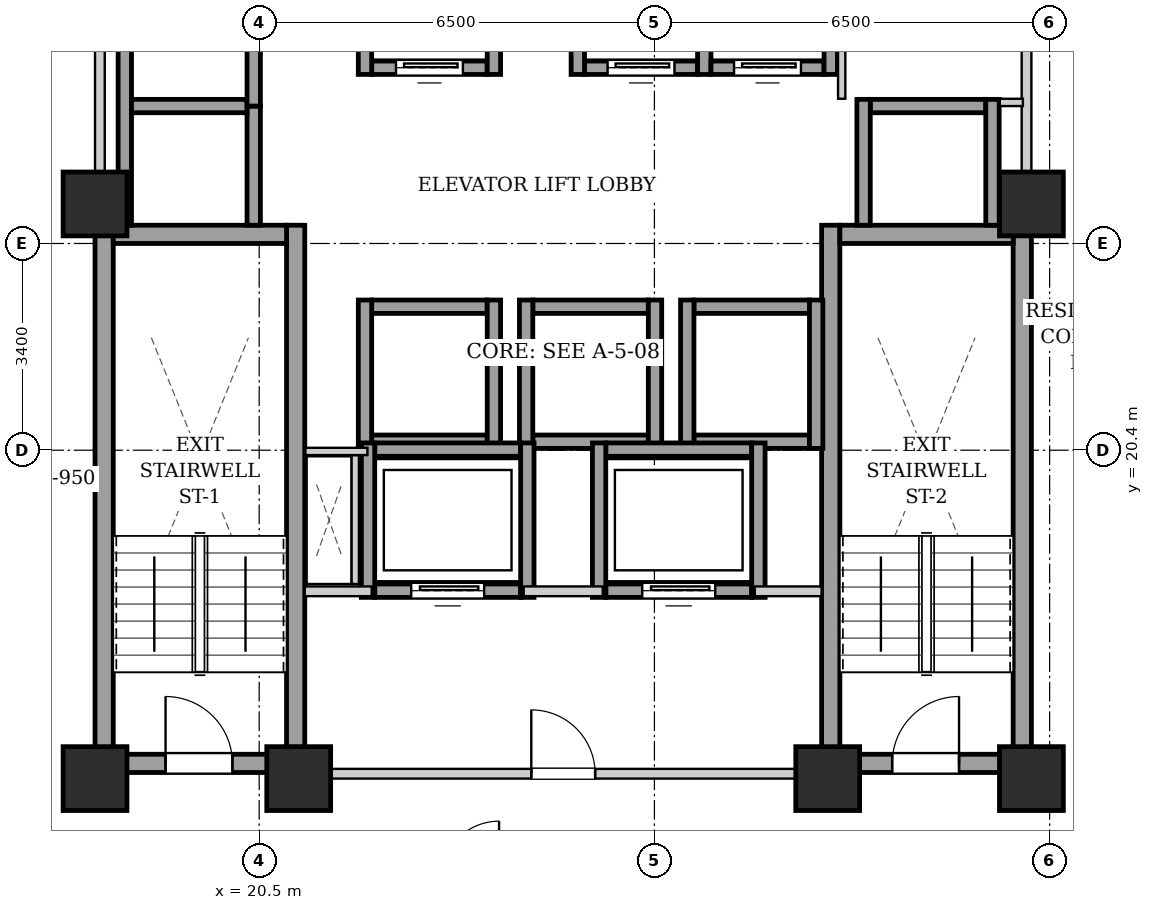
"""IFC4 building model, lengths in metres.
Left out: names, types, materials, properties, quantities, classifications, styles, units other than length and angle.
Written with IfcOpenShell. Run it as: python <this file> out.ifc"""

import sys

from ifc_helpers import new_model, si_unit, direction, frame, frame_2d, origin, origin_2d, place, context, subcontext, project, spatial, rectangle, extrude, element, fill, save


model = new_model("IFC4")
c1 = context("Model", 3, precision=1e-05, world=origin(), true_north=direction((0.0, 1.0)))
c2 = subcontext(c1, "Body", "Model", "MODEL_VIEW")
j1 = project(units=[si_unit("LENGTHUNIT", "METRE"), si_unit("PLANEANGLEUNIT", "RADIAN")], contexts=[c1])
p1 = place(None, origin())
s1 = spatial("IfcSite", under=j1, at=p1, CompositionType="ELEMENT")
p2 = place(p1, origin())
s2 = spatial("IfcBuilding", under=s1, at=p2, CompositionType="ELEMENT")
p3 = place(p2, frame((0.0, 0.0, 81.5)))
s3 = spatial("IfcBuildingStorey", under=s2, at=p3, CompositionType="ELEMENT", Elevation=81.5)
for number, where, z_axis, x_axis in (
    (1, (17.8, 15.0, 0.0), (0.0, 0.0, 1.0), (1.0, 0.0, 0.0)),
    (2, (21.15, 15.0, 0.0), (0.0, 0.0, 1.0), (1.0, 0.0, 0.0)),
    (3, (29.85, 15.0, 0.0), (0.0, 0.0, 1.0), (1.0, 0.0, 0.0)),
    (4, (33.2, 15.0, 0.0), (0.0, 0.0, 1.0), (1.0, 0.0, 0.0)),
    (5, (17.8, 24.45, 0.0), (0.0, 0.0, 1.0), (1.0, 0.0, 0.0)),
    (6, (33.2, 24.45, 0.0), (0.0, 0.0, 1.0), (1.0, 0.0, 0.0)),
):
    element("IfcColumn", number, at=place(p3, frame(where, z_axis=z_axis, x_axis=x_axis)), inside=s3, PredefinedType="COLUMN", context=c2, shape_type="SweptSolid", body=[
        extrude(rectangle(XDim=1.05, YDim=1.05, at=origin_2d()), origin(), (0.0, 0.0, 1.0), 3.2),
    ])
for number, where, z_axis, x_axis in (
    (7, (17.95, 15.1, 0.0), (0.0, 0.0, 1.0), (0.0, 1.0, 0.0)),
    (8, (21.1, 15.1, 0.0), (0.0, 0.0, 1.0), (0.0, 1.0, 0.0)),
):
    element("IfcWall", number, at=place(p3, frame(where, z_axis=z_axis, x_axis=x_axis)), inside=s3, PredefinedType="SHEAR", context=c2, shape_type="SweptSolid", body=[
        extrude(rectangle(XDim=9.0, YDim=0.3, at=frame_2d((4.5, 0.0))), origin(), (0.0, 0.0, 1.0), 2.94),
    ])
p4 = place(p3, frame((18.1, 23.95, 0.0), z_axis=(0.0, 0.0, 1.0), x_axis=(1.0, 0.0, 0.0)))
e9 = element("IfcWall", 9, at=p4, inside=s3, PredefinedType="SHEAR", context=c2, shape_type="SweptSolid", body=[
    extrude(rectangle(XDim=2.85, YDim=0.3, at=frame_2d((1.425, 0.0))), origin(), (0.0, 0.0, 1.0), 2.94),
])
p5 = place(p3, frame((18.1, 15.25, 0.0), z_axis=(0.0, 0.0, 1.0), x_axis=(1.0, 0.0, 0.0)))
e10 = element("IfcWall", 10, at=p5, inside=s3, PredefinedType="SHEAR", context=c2, shape_type="SweptSolid", body=[
    extrude(rectangle(XDim=2.85, YDim=0.3, at=frame_2d((1.425, 0.0))), origin(), (0.0, 0.0, 1.0), 2.94),
])
p6 = place(p5, frame((0.86, 0.0, 0.0)))
e11 = element("IfcOpeningElement", 11, at=p6, cuts=e10, PredefinedType="OPENING", context=c2, shape_type="SweptSolid", body=[
    extrude(rectangle(XDim=1.1, YDim=2.05, at=frame_2d((0.55, 1.025))), frame((0.0, 0.16, 0.0), z_axis=(0.0, -1.0, 0.0), x_axis=(1.0, 0.0, 0.0)), (0.0, 0.0, 1.0), 0.32),
])
for number, where, z_axis, x_axis in (
    (12, (29.9, 15.1, 0.0), (0.0, 0.0, 1.0), (0.0, 1.0, 0.0)),
    (13, (33.05, 15.1, 0.0), (0.0, 0.0, 1.0), (0.0, 1.0, 0.0)),
):
    element("IfcWall", number, at=place(p3, frame(where, z_axis=z_axis, x_axis=x_axis)), inside=s3, PredefinedType="SHEAR", context=c2, shape_type="SweptSolid", body=[
        extrude(rectangle(XDim=9.0, YDim=0.3, at=frame_2d((4.5, 0.0))), origin(), (0.0, 0.0, 1.0), 2.94),
    ])
p7 = place(p3, frame((30.05, 23.95, 0.0), z_axis=(0.0, 0.0, 1.0), x_axis=(1.0, 0.0, 0.0)))
e14 = element("IfcWall", 14, at=p7, inside=s3, PredefinedType="SHEAR", context=c2, shape_type="SweptSolid", body=[
    extrude(rectangle(XDim=2.85, YDim=0.3, at=frame_2d((1.425, 0.0))), origin(), (0.0, 0.0, 1.0), 2.94),
])
p8 = place(p3, frame((30.05, 15.25, 0.0), z_axis=(0.0, 0.0, 1.0), x_axis=(1.0, 0.0, 0.0)))
e15 = element("IfcWall", 15, at=p8, inside=s3, PredefinedType="SHEAR", context=c2, shape_type="SweptSolid", body=[
    extrude(rectangle(XDim=2.85, YDim=0.3, at=frame_2d((1.425, 0.0))), origin(), (0.0, 0.0, 1.0), 2.94),
])
p9 = place(p8, frame((0.86, 0.0, 0.0)))
e16 = element("IfcOpeningElement", 16, at=p9, cuts=e15, PredefinedType="OPENING", context=c2, shape_type="SweptSolid", body=[
    extrude(rectangle(XDim=1.1, YDim=2.05, at=frame_2d((0.55, 1.025))), frame((0.0, 0.16, 0.0), z_axis=(0.0, -1.0, 0.0), x_axis=(1.0, 0.0, 0.0)), (0.0, 0.0, 1.0), 0.32),
])
p10 = place(p3, frame((22.35, 26.69, 0.0), z_axis=(0.0, 0.0, 1.0), x_axis=(1.0, 0.0, 0.0)))
e17 = element("IfcWall", 17, at=p10, inside=s3, PredefinedType="SHEAR", context=c2, shape_type="SweptSolid", body=[
    extrude(rectangle(XDim=1.9, YDim=0.22, at=frame_2d((0.95, 0.0))), origin(), (0.0, 0.0, 1.0), 2.94),
])
p11 = place(p10, frame((0.4, 0.0, 0.0)))
e18 = element("IfcOpeningElement", 18, at=p11, cuts=e17, PredefinedType="OPENING", context=c2, shape_type="SweptSolid", body=[
    extrude(rectangle(XDim=1.1, YDim=2.15, at=frame_2d((0.55, 1.075))), frame((0.0, 0.12, 0.0), z_axis=(0.0, -1.0, 0.0), x_axis=(1.0, 0.0, 0.0)), (0.0, 0.0, 1.0), 0.24),
])
for number, where, z_axis, x_axis in (
    (19, (22.24, 26.58, 0.0), (0.0, 0.0, 1.0), (0.0, 1.0, 0.0)),
    (20, (24.36, 26.58, 0.0), (0.0, 0.0, 1.0), (0.0, 1.0, 0.0)),
):
    element("IfcWall", number, at=place(p3, frame(where, z_axis=z_axis, x_axis=x_axis)), inside=s3, PredefinedType="SHEAR", context=c2, shape_type="SweptSolid", body=[
        extrude(rectangle(XDim=2.44, YDim=0.22, at=frame_2d((1.22, 0.0))), origin(), (0.0, 0.0, 1.0), 2.94),
    ])
p12 = place(p3, frame((25.85, 26.69, 0.0), z_axis=(0.0, 0.0, 1.0), x_axis=(1.0, 0.0, 0.0)))
e21 = element("IfcWall", 21, at=p12, inside=s3, PredefinedType="SHEAR", context=c2, shape_type="SweptSolid", body=[
    extrude(rectangle(XDim=1.86, YDim=0.22, at=frame_2d((0.93, 0.0))), origin(), (0.0, 0.0, 1.0), 2.94),
])
p13 = place(p12, frame((0.38, 0.0, 0.0)))
e22 = element("IfcOpeningElement", 22, at=p13, cuts=e21, PredefinedType="OPENING", context=c2, shape_type="SweptSolid", body=[
    extrude(rectangle(XDim=1.1, YDim=2.15, at=frame_2d((0.55, 1.075))), frame((0.0, 0.12, 0.0), z_axis=(0.0, -1.0, 0.0), x_axis=(1.0, 0.0, 0.0)), (0.0, 0.0, 1.0), 0.24),
])
for number, where, z_axis, x_axis in (
    (23, (25.74, 26.58, 0.0), (0.0, 0.0, 1.0), (0.0, 1.0, 0.0)),
    (24, (27.82, 26.58, 0.0), (0.0, 0.0, 1.0), (0.0, 1.0, 0.0)),
):
    element("IfcWall", number, at=place(p3, frame(where, z_axis=z_axis, x_axis=x_axis)), inside=s3, PredefinedType="SHEAR", context=c2, shape_type="SweptSolid", body=[
        extrude(rectangle(XDim=2.44, YDim=0.22, at=frame_2d((1.22, 0.0))), origin(), (0.0, 0.0, 1.0), 2.94),
    ])
p14 = place(p3, frame((27.93, 26.69, 0.0), z_axis=(0.0, 0.0, 1.0), x_axis=(1.0, 0.0, 0.0)))
e25 = element("IfcWall", 25, at=p14, inside=s3, PredefinedType="SHEAR", context=c2, shape_type="SweptSolid", body=[
    extrude(rectangle(XDim=1.86, YDim=0.22, at=frame_2d((0.93, 0.0))), origin(), (0.0, 0.0, 1.0), 2.94),
])
p15 = place(p14, frame((0.38, 0.0, 0.0)))
e26 = element("IfcOpeningElement", 26, at=p15, cuts=e25, PredefinedType="OPENING", context=c2, shape_type="SweptSolid", body=[
    extrude(rectangle(XDim=1.1, YDim=2.15, at=frame_2d((0.55, 1.075))), frame((0.0, 0.12, 0.0), z_axis=(0.0, -1.0, 0.0), x_axis=(1.0, 0.0, 0.0)), (0.0, 0.0, 1.0), 0.24),
])
p16 = place(p3, frame((29.9, 26.58, 0.0), z_axis=(0.0, 0.0, 1.0), x_axis=(0.0, 1.0, 0.0)))
e27 = element("IfcWall", 27, at=p16, inside=s3, PredefinedType="SHEAR", context=c2, shape_type="SweptSolid", body=[
    extrude(rectangle(XDim=2.44, YDim=0.22, at=frame_2d((1.22, 0.0))), origin(), (0.0, 0.0, 1.0), 2.94),
])
for number, where, z_axis, x_axis in (
    (28, (22.35, 20.54, 0.0), (0.0, 0.0, 1.0), (1.0, 0.0, 0.0)),
    (29, (22.35, 22.76, 0.0), (0.0, 0.0, 1.0), (1.0, 0.0, 0.0)),
):
    element("IfcWall", number, at=place(p3, frame(where, z_axis=z_axis, x_axis=x_axis)), inside=s3, PredefinedType="SHEAR", context=c2, shape_type="SweptSolid", body=[
        extrude(rectangle(XDim=1.9, YDim=0.22, at=frame_2d((0.95, 0.0))), origin(), (0.0, 0.0, 1.0), 2.94),
    ])
for number, where, z_axis, x_axis in (
    (30, (22.24, 20.43, 0.0), (0.0, 0.0, 1.0), (0.0, 1.0, 0.0)),
    (31, (24.36, 20.43, 0.0), (0.0, 0.0, 1.0), (0.0, 1.0, 0.0)),
):
    element("IfcWall", number, at=place(p3, frame(where, z_axis=z_axis, x_axis=x_axis)), inside=s3, PredefinedType="SHEAR", context=c2, shape_type="SweptSolid", body=[
        extrude(rectangle(XDim=2.44, YDim=0.22, at=frame_2d((1.22, 0.0))), origin(), (0.0, 0.0, 1.0), 2.94),
    ])
for number, where, z_axis, x_axis in (
    (32, (25.0, 20.54, 0.0), (0.0, 0.0, 1.0), (1.0, 0.0, 0.0)),
    (33, (25.0, 22.76, 0.0), (0.0, 0.0, 1.0), (1.0, 0.0, 0.0)),
):
    element("IfcWall", number, at=place(p3, frame(where, z_axis=z_axis, x_axis=x_axis)), inside=s3, PredefinedType="SHEAR", context=c2, shape_type="SweptSolid", body=[
        extrude(rectangle(XDim=1.9, YDim=0.22, at=frame_2d((0.95, 0.0))), origin(), (0.0, 0.0, 1.0), 2.94),
    ])
for number, where, z_axis, x_axis in (
    (34, (24.89, 20.43, 0.0), (0.0, 0.0, 1.0), (0.0, 1.0, 0.0)),
    (35, (27.01, 20.43, 0.0), (0.0, 0.0, 1.0), (0.0, 1.0, 0.0)),
):
    element("IfcWall", number, at=place(p3, frame(where, z_axis=z_axis, x_axis=x_axis)), inside=s3, PredefinedType="SHEAR", context=c2, shape_type="SweptSolid", body=[
        extrude(rectangle(XDim=2.44, YDim=0.22, at=frame_2d((1.22, 0.0))), origin(), (0.0, 0.0, 1.0), 2.94),
    ])
for number, where, z_axis, x_axis in (
    (36, (27.65, 20.54, 0.0), (0.0, 0.0, 1.0), (1.0, 0.0, 0.0)),
    (37, (27.65, 22.76, 0.0), (0.0, 0.0, 1.0), (1.0, 0.0, 0.0)),
):
    element("IfcWall", number, at=place(p3, frame(where, z_axis=z_axis, x_axis=x_axis)), inside=s3, PredefinedType="SHEAR", context=c2, shape_type="SweptSolid", body=[
        extrude(rectangle(XDim=1.9, YDim=0.22, at=frame_2d((0.95, 0.0))), origin(), (0.0, 0.0, 1.0), 2.94),
    ])
for number, where, z_axis, x_axis in (
    (38, (27.54, 20.43, 0.0), (0.0, 0.0, 1.0), (0.0, 1.0, 0.0)),
    (39, (29.66, 20.43, 0.0), (0.0, 0.0, 1.0), (0.0, 1.0, 0.0)),
):
    element("IfcWall", number, at=place(p3, frame(where, z_axis=z_axis, x_axis=x_axis)), inside=s3, PredefinedType="SHEAR", context=c2, shape_type="SweptSolid", body=[
        extrude(rectangle(XDim=2.44, YDim=0.22, at=frame_2d((1.22, 0.0))), origin(), (0.0, 0.0, 1.0), 2.94),
    ])
p17 = place(p3, frame((18.29, 24.1, 0.0), z_axis=(0.0, 0.0, 1.0), x_axis=(0.0, 1.0, 0.0)))
e40 = element("IfcWall", 40, at=p17, inside=s3, PredefinedType="SHEAR", context=c2, shape_type="SweptSolid", body=[
    extrude(rectangle(XDim=4.14, YDim=0.22, at=frame_2d((2.07, 0.0))), origin(), (0.0, 0.0, 1.0), 2.94),
])
p18 = place(p3, frame((20.41, 24.1, 0.0), z_axis=(0.0, 0.0, 1.0), x_axis=(0.0, 1.0, 0.0)))
e41 = element("IfcWall", 41, at=p18, inside=s3, PredefinedType="SHEAR", context=c2, shape_type="SweptSolid", body=[
    extrude(rectangle(XDim=1.96, YDim=0.22, at=frame_2d((0.98, 0.0))), origin(), (0.0, 0.0, 1.0), 2.94),
])
p19 = place(p3, frame((18.4, 26.06, 0.0), z_axis=(0.0, 0.0, 1.0), x_axis=(1.0, 0.0, 0.0)))
e42 = element("IfcWall", 42, at=p19, inside=s3, PredefinedType="SHEAR", context=c2, shape_type="SweptSolid", body=[
    extrude(rectangle(XDim=1.9, YDim=0.22, at=frame_2d((0.95, 0.0))), origin(), (0.0, 0.0, 1.0), 2.94),
])
p20 = place(p3, frame((20.41, 26.06, 0.0), z_axis=(0.0, 0.0, 1.0), x_axis=(0.0, 1.0, 0.0)))
e43 = element("IfcWall", 43, at=p20, inside=s3, PredefinedType="SHEAR", context=c2, shape_type="SweptSolid", body=[
    extrude(rectangle(XDim=2.18, YDim=0.22, at=frame_2d((1.09, 0.0))), origin(), (0.0, 0.0, 1.0), 2.94),
])
p21 = place(p3, frame((30.55, 26.06, 0.0), z_axis=(0.0, 0.0, 1.0), x_axis=(1.0, 0.0, 0.0)))
e44 = element("IfcWall", 44, at=p21, inside=s3, PredefinedType="SHEAR", context=c2, shape_type="SweptSolid", body=[
    extrude(rectangle(XDim=1.9, YDim=0.22, at=frame_2d((0.95, 0.0))), origin(), (0.0, 0.0, 1.0), 2.94),
])
for number, where, z_axis, x_axis in (
    (45, (30.44, 24.1, 0.0), (0.0, 0.0, 1.0), (0.0, 1.0, 0.0)),
    (46, (32.56, 24.1, 0.0), (0.0, 0.0, 1.0), (0.0, 1.0, 0.0)),
):
    element("IfcWall", number, at=place(p3, frame(where, z_axis=z_axis, x_axis=x_axis)), inside=s3, PredefinedType="SHEAR", context=c2, shape_type="SweptSolid", body=[
        extrude(rectangle(XDim=2.07, YDim=0.22, at=frame_2d((1.035, 0.0))), origin(), (0.0, 0.0, 1.0), 2.94),
    ])
p22 = place(p3, frame((22.4, 18.09, 0.0), z_axis=(0.0, 0.0, 1.0), x_axis=(1.0, 0.0, 0.0)))
e47 = element("IfcWall", 47, at=p22, inside=s3, PredefinedType="SHEAR", context=c2, shape_type="SweptSolid", body=[
    extrude(rectangle(XDim=2.4, YDim=0.22, at=frame_2d((1.2, 0.0))), origin(), (0.0, 0.0, 1.0), 2.94),
])
p23 = place(p22, frame((0.6, 0.0, 0.0)))
e48 = element("IfcOpeningElement", 48, at=p23, cuts=e47, PredefinedType="OPENING", context=c2, shape_type="SweptSolid", body=[
    extrude(rectangle(XDim=1.2, YDim=2.15, at=frame_2d((0.6, 1.075))), frame((0.0, 0.12, 0.0), z_axis=(0.0, -1.0, 0.0), x_axis=(1.0, 0.0, 0.0)), (0.0, 0.0, 1.0), 0.24),
])
p24 = place(p3, frame((22.4, 20.41, 0.0), z_axis=(0.0, 0.0, 1.0), x_axis=(1.0, 0.0, 0.0)))
e49 = element("IfcWall", 49, at=p24, inside=s3, PredefinedType="SHEAR", context=c2, shape_type="SweptSolid", body=[
    extrude(rectangle(XDim=2.4, YDim=0.22, at=frame_2d((1.2, 0.0))), origin(), (0.0, 0.0, 1.0), 2.94),
])
for number, where, z_axis, x_axis in (
    (50, (22.29, 17.98, 0.0), (0.0, 0.0, 1.0), (0.0, 1.0, 0.0)),
    (51, (24.91, 17.98, 0.0), (0.0, 0.0, 1.0), (0.0, 1.0, 0.0)),
):
    element("IfcWall", number, at=place(p3, frame(where, z_axis=z_axis, x_axis=x_axis)), inside=s3, PredefinedType="SHEAR", context=c2, shape_type="SweptSolid", body=[
        extrude(rectangle(XDim=2.54, YDim=0.22, at=frame_2d((1.27, 0.0))), origin(), (0.0, 0.0, 1.0), 2.94),
    ])
p25 = place(p3, frame((26.2, 18.09, 0.0), z_axis=(0.0, 0.0, 1.0), x_axis=(1.0, 0.0, 0.0)))
e52 = element("IfcWall", 52, at=p25, inside=s3, PredefinedType="SHEAR", context=c2, shape_type="SweptSolid", body=[
    extrude(rectangle(XDim=2.4, YDim=0.22, at=frame_2d((1.2, 0.0))), origin(), (0.0, 0.0, 1.0), 2.94),
])
p26 = place(p25, frame((0.6, 0.0, 0.0)))
e53 = element("IfcOpeningElement", 53, at=p26, cuts=e52, PredefinedType="OPENING", context=c2, shape_type="SweptSolid", body=[
    extrude(rectangle(XDim=1.2, YDim=2.15, at=frame_2d((0.6, 1.075))), frame((0.0, 0.12, 0.0), z_axis=(0.0, -1.0, 0.0), x_axis=(1.0, 0.0, 0.0)), (0.0, 0.0, 1.0), 0.24),
])
p27 = place(p3, frame((26.2, 20.41, 0.0), z_axis=(0.0, 0.0, 1.0), x_axis=(1.0, 0.0, 0.0)))
e54 = element("IfcWall", 54, at=p27, inside=s3, PredefinedType="SHEAR", context=c2, shape_type="SweptSolid", body=[
    extrude(rectangle(XDim=2.4, YDim=0.22, at=frame_2d((1.2, 0.0))), origin(), (0.0, 0.0, 1.0), 2.94),
])
for number, where, z_axis, x_axis in (
    (55, (26.09, 17.98, 0.0), (0.0, 0.0, 1.0), (0.0, 1.0, 0.0)),
    (56, (28.71, 17.98, 0.0), (0.0, 0.0, 1.0), (0.0, 1.0, 0.0)),
):
    element("IfcWall", number, at=place(p3, frame(where, z_axis=z_axis, x_axis=x_axis)), inside=s3, PredefinedType="SHEAR", context=c2, shape_type="SweptSolid", body=[
        extrude(rectangle(XDim=2.54, YDim=0.22, at=frame_2d((1.27, 0.0))), origin(), (0.0, 0.0, 1.0), 2.94),
    ])
p28 = place(p3, frame((21.25, 15.08, 0.0), z_axis=(0.0, 0.0, 1.0), x_axis=(1.0, 0.0, 0.0)))
e57 = element("IfcWall", 57, at=p28, inside=s3, PredefinedType="PARTITIONING", context=c2, shape_type="SweptSolid", body=[
    extrude(rectangle(XDim=8.5, YDim=0.16, at=frame_2d((4.25, 0.0))), origin(), (0.0, 0.0, 1.0), 2.309),
])
p29 = place(p28, frame((3.725, 0.0, 0.0)))
e58 = element("IfcOpeningElement", 58, at=p29, cuts=e57, PredefinedType="OPENING", context=c2, shape_type="SweptSolid", body=[
    extrude(rectangle(XDim=1.05, YDim=2.05, at=frame_2d((0.525, 1.025))), frame((0.0, 0.09, 0.0), z_axis=(0.0, -1.0, 0.0), x_axis=(1.0, 0.0, 0.0)), (0.0, 0.0, 1.0), 0.18),
])
p30 = place(p3, frame((21.25, 18.08, 0.0), z_axis=(0.0, 0.0, 1.0), x_axis=(1.0, 0.0, 0.0)))
e59 = element("IfcWall", 59, at=p30, inside=s3, PredefinedType="PARTITIONING", context=c2, shape_type="SweptSolid", body=[
    extrude(rectangle(XDim=1.1, YDim=0.16, at=frame_2d((0.55, 0.0))), origin(), (0.0, 0.0, 1.0), 2.94),
])
p31 = place(p3, frame((24.85, 18.08, 0.0), z_axis=(0.0, 0.0, 1.0), x_axis=(1.0, 0.0, 0.0)))
e60 = element("IfcWall", 60, at=p31, inside=s3, PredefinedType="PARTITIONING", context=c2, shape_type="SweptSolid", body=[
    extrude(rectangle(XDim=1.3, YDim=0.16, at=frame_2d((0.65, 0.0))), origin(), (0.0, 0.0, 1.0), 2.94),
])
p32 = place(p3, frame((28.65, 18.08, 0.0), z_axis=(0.0, 0.0, 1.0), x_axis=(1.0, 0.0, 0.0)))
e61 = element("IfcWall", 61, at=p32, inside=s3, PredefinedType="PARTITIONING", context=c2, shape_type="SweptSolid", body=[
    extrude(rectangle(XDim=1.1, YDim=0.16, at=frame_2d((0.55, 0.0))), origin(), (0.0, 0.0, 1.0), 2.94),
])
for number, where, z_axis, x_axis in (
    (62, (17.88, 24.12, 0.0), (0.0, 0.0, 1.0), (0.0, 1.0, 0.0)),
    (63, (33.12, 24.12, 0.0), (0.0, 0.0, 1.0), (0.0, 1.0, 0.0)),
):
    element("IfcWall", number, at=place(p3, frame(where, z_axis=z_axis, x_axis=x_axis)), inside=s3, PredefinedType="PARTITIONING", context=c2, shape_type="SweptSolid", body=[
        extrude(rectangle(XDim=4.76, YDim=0.16, at=frame_2d((2.38, 0.0))), origin(), (0.0, 0.0, 1.0), 2.94),
    ])
p33 = place(p3, frame((22.08, 18.2, 0.0), z_axis=(0.0, 0.0, 1.0), x_axis=(0.0, 1.0, 0.0)))
e64 = element("IfcWall", 64, at=p33, inside=s3, PredefinedType="PARTITIONING", context=c2, shape_type="SweptSolid", body=[
    extrude(rectangle(XDim=2.12, YDim=0.12, at=frame_2d((1.06, 0.0))), origin(), (0.0, 0.0, 1.0), 2.94),
])
p34 = place(p3, frame((22.28, 20.38, 0.0), z_axis=(0.0, 0.0, 1.0), x_axis=(-1.0, 0.0, 0.0)))
e65 = element("IfcWall", 65, at=p34, inside=s3, PredefinedType="PARTITIONING", context=c2, shape_type="SweptSolid", body=[
    extrude(rectangle(XDim=1.02, YDim=0.12, at=frame_2d((0.51, 0.0))), origin(), (0.0, 0.0, 1.0), 2.94),
])
p35 = place(p3, frame((30.08, 26.18, 0.0), z_axis=(0.0, 0.0, 1.0), x_axis=(0.0, 1.0, 0.0)))
e66 = element("IfcWall", 66, at=p35, inside=s3, PredefinedType="PARTITIONING", context=c2, shape_type="SweptSolid", body=[
    extrude(rectangle(XDim=2.68, YDim=0.12, at=frame_2d((1.34, 0.0))), origin(), (0.0, 0.0, 1.0), 2.94),
])
p36 = place(p3, frame((32.68, 26.12, 0.0), z_axis=(0.0, 0.0, 1.0), x_axis=(1.0, 0.0, 0.0)))
e67 = element("IfcWall", 67, at=p36, inside=s3, PredefinedType="PARTITIONING", context=c2, shape_type="SweptSolid", body=[
    extrude(rectangle(XDim=0.38, YDim=0.12, at=frame_2d((0.19, 0.0))), origin(), (0.0, 0.0, 1.0), 2.94),
])
p37 = place(p6, origin())
e68 = element("IfcDoor", 68, at=p37, inside=s3, OperationType="SINGLE_SWING_LEFT", PredefinedType="DOOR", context=c2, shape_type="SweptSolid", body=[
    extrude(rectangle(XDim=1.1, YDim=2.05, at=frame_2d((0.55, 1.025))), frame((0.0, 0.025, 0.0), z_axis=(0.0, -1.0, 0.0), x_axis=(1.0, 0.0, 0.0)), (0.0, 0.0, 1.0), 0.05),
])
fill(e11, e68)
p38 = place(p9, origin())
e69 = element("IfcDoor", 69, at=p38, inside=s3, OperationType="SINGLE_SWING_RIGHT", PredefinedType="DOOR", context=c2, shape_type="SweptSolid", body=[
    extrude(rectangle(XDim=1.1, YDim=2.05, at=frame_2d((0.55, 1.025))), frame((0.0, 0.025, 0.0), z_axis=(0.0, -1.0, 0.0), x_axis=(1.0, 0.0, 0.0)), (0.0, 0.0, 1.0), 0.05),
])
fill(e16, e69)
p39 = place(p11, origin())
e70 = element("IfcDoor", 70, at=p39, inside=s3, OperationType="SLIDING_TO_LEFT", PredefinedType="DOOR", context=c2, shape_type="SweptSolid", body=[
    extrude(rectangle(XDim=1.1, YDim=2.15, at=frame_2d((0.55, 1.075))), frame((0.0, 0.025, 0.0), z_axis=(0.0, -1.0, 0.0), x_axis=(1.0, 0.0, 0.0)), (0.0, 0.0, 1.0), 0.05),
])
fill(e18, e70)
p40 = place(p13, origin())
e71 = element("IfcDoor", 71, at=p40, inside=s3, OperationType="SLIDING_TO_LEFT", PredefinedType="DOOR", context=c2, shape_type="SweptSolid", body=[
    extrude(rectangle(XDim=1.1, YDim=2.15, at=frame_2d((0.55, 1.075))), frame((0.0, 0.025, 0.0), z_axis=(0.0, -1.0, 0.0), x_axis=(1.0, 0.0, 0.0)), (0.0, 0.0, 1.0), 0.05),
])
fill(e22, e71)
p41 = place(p15, origin())
e72 = element("IfcDoor", 72, at=p41, inside=s3, OperationType="SLIDING_TO_LEFT", PredefinedType="DOOR", context=c2, shape_type="SweptSolid", body=[
    extrude(rectangle(XDim=1.1, YDim=2.15, at=frame_2d((0.55, 1.075))), frame((0.0, 0.025, 0.0), z_axis=(0.0, -1.0, 0.0), x_axis=(1.0, 0.0, 0.0)), (0.0, 0.0, 1.0), 0.05),
])
fill(e26, e72)
p42 = place(p23, origin())
e73 = element("IfcDoor", 73, at=p42, inside=s3, OperationType="SLIDING_TO_LEFT", PredefinedType="DOOR", context=c2, shape_type="SweptSolid", body=[
    extrude(rectangle(XDim=1.2, YDim=2.15, at=frame_2d((0.6, 1.075))), frame((0.0, 0.025, 0.0), z_axis=(0.0, -1.0, 0.0), x_axis=(1.0, 0.0, 0.0)), (0.0, 0.0, 1.0), 0.05),
])
fill(e48, e73)
p43 = place(p26, origin())
e74 = element("IfcDoor", 74, at=p43, inside=s3, OperationType="SLIDING_TO_LEFT", PredefinedType="DOOR", context=c2, shape_type="SweptSolid", body=[
    extrude(rectangle(XDim=1.2, YDim=2.15, at=frame_2d((0.6, 1.075))), frame((0.0, 0.025, 0.0), z_axis=(0.0, -1.0, 0.0), x_axis=(1.0, 0.0, 0.0)), (0.0, 0.0, 1.0), 0.05),
])
fill(e53, e74)
p44 = place(p29, origin())
e75 = element("IfcDoor", 75, at=p44, inside=s3, OperationType="SINGLE_SWING_LEFT", PredefinedType="DOOR", context=c2, shape_type="SweptSolid", body=[
    extrude(rectangle(XDim=1.05, YDim=2.05, at=frame_2d((0.525, 1.025))), frame((0.0, 0.025, 0.0), z_axis=(0.0, -1.0, 0.0), x_axis=(1.0, 0.0, 0.0)), (0.0, 0.0, 1.0), 0.05),
])
fill(e58, e75)
save(model, sys.argv[1])
